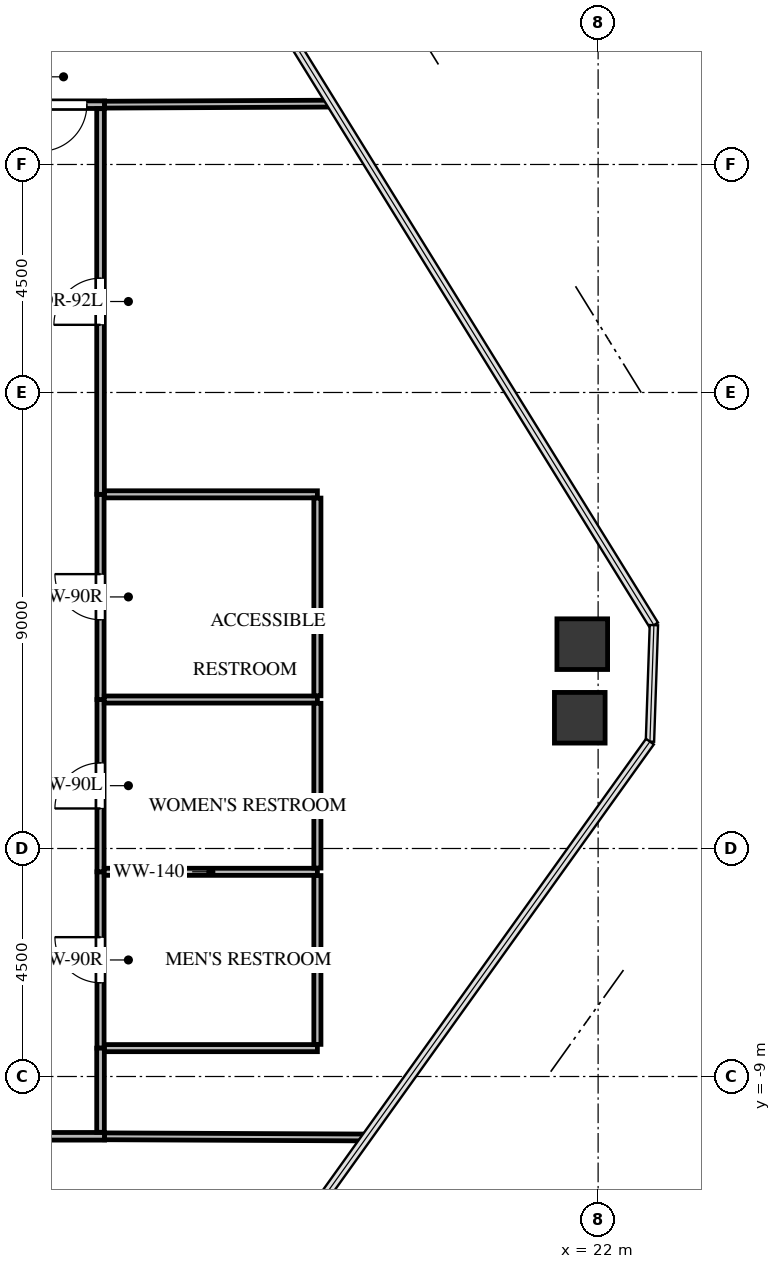
"""IFC4 building model, lengths in metres.
Left out: names, types, materials, properties, quantities, classifications, styles, units other than length and angle.
Written with IfcOpenShell. Run it as: python <this file> out.ifc"""

import sys

from ifc_helpers import new_model, si_unit, direction, frame, frame_2d, origin, origin_2d, place, context, subcontext, project, spatial, rectangle, extrude, source, transform, mapped, element, fill, save


model = new_model("IFC4")
c1 = context("Model", 3, precision=1e-05, world=origin(), true_north=direction((0.0, 1.0)))
c2 = subcontext(c1, "Body", "Model", "MODEL_VIEW")
j1 = project(units=[si_unit("LENGTHUNIT", "METRE"), si_unit("PLANEANGLEUNIT", "RADIAN")], contexts=[c1])
p1 = place(None, origin())
s1 = spatial("IfcSite", under=j1, at=p1, CompositionType="ELEMENT")
p2 = place(p1, origin())
s2 = spatial("IfcBuilding", under=s1, at=p2, CompositionType="ELEMENT")
p3 = place(p2, frame((0.0, 0.0, 187.0)))
s3 = spatial("IfcBuildingStorey", under=s2, at=p3, CompositionType="ELEMENT", Elevation=187.0)
m1 = source(origin(), c2, "Body", "SweptSolid", [
    extrude(rectangle(XDim=1.0, YDim=1.0, at=origin_2d()), origin(), (0.0, 0.0, 1.0), 3.3),
])
for number, where, z_axis, x_axis in (
    (1, (21.687, -0.467, -0.24), (0.0, 0.0, 1.0), (1.0, 0.0, 0.0)),
    (2, (21.638, -1.92, -0.24), (0.0, 0.0, 1.0), (1.0, 0.0, 0.0)),
):
    element("IfcColumn", number, at=place(p3, frame(where, z_axis=z_axis, x_axis=x_axis)), inside=s3, PredefinedType="COLUMN", context=c2, shape_type="MappedRepresentation", body=[
        mapped(m1, transform((0.0, 0.0, 0.0), x_axis=(1.0, 0.0, 0.0), y_axis=(0.0, 1.0, 0.0), z_axis=(0.0, 0.0, 1.0), scale=1.0)),
    ])
p4 = place(p3, frame((12.18, -8.44, 0.0), z_axis=(0.0, 0.0, 1.0), x_axis=(0.0, 1.0, 0.0)))
e3 = element("IfcWall", 3, at=p4, inside=s3, PredefinedType="PARTITIONING", context=c2, shape_type="SweptSolid", body=[
    extrude(rectangle(XDim=3.48, YDim=0.14, at=frame_2d((1.74, 0.0))), origin(), (0.0, 0.0, 1.0), 3.045),
])
p5 = place(p4, frame((1.29, 0.0, 0.0)))
e4 = element("IfcOpeningElement", 4, at=p5, cuts=e3, PredefinedType="OPENING", context=c2, shape_type="SweptSolid", body=[
    extrude(rectangle(XDim=0.9, YDim=2.05, at=frame_2d((0.45, 1.025))), frame((0.0, 0.08, 0.0), z_axis=(0.0, -1.0, 0.0), x_axis=(1.0, 0.0, 0.0)), (0.0, 0.0, 1.0), 0.16),
])
p6 = place(p3, frame((12.18, -4.96, 0.0), z_axis=(0.0, 0.0, 1.0), x_axis=(0.0, 1.0, 0.0)))
e5 = element("IfcWall", 5, at=p6, inside=s3, PredefinedType="PARTITIONING", context=c2, shape_type="SweptSolid", body=[
    extrude(rectangle(XDim=3.4, YDim=0.14, at=frame_2d((1.7, 0.0))), origin(), (0.0, 0.0, 1.0), 3.045),
])
p7 = place(p6, frame((1.25, 0.0, 0.0)))
e6 = element("IfcOpeningElement", 6, at=p7, cuts=e5, PredefinedType="OPENING", context=c2, shape_type="SweptSolid", body=[
    extrude(rectangle(XDim=0.9, YDim=2.05, at=frame_2d((0.45, 1.025))), frame((0.0, 0.08, 0.0), z_axis=(0.0, -1.0, 0.0), x_axis=(1.0, 0.0, 0.0)), (0.0, 0.0, 1.0), 0.16),
])
p8 = place(p3, frame((12.18, -1.56, 0.0), z_axis=(0.0, 0.0, 1.0), x_axis=(0.0, 1.0, 0.0)))
e7 = element("IfcWall", 7, at=p8, inside=s3, PredefinedType="PARTITIONING", context=c2, shape_type="SweptSolid", body=[
    extrude(rectangle(XDim=4.05, YDim=0.14, at=frame_2d((2.025, 0.0))), origin(), (0.0, 0.0, 1.0), 2.242),
])
p9 = place(p8, frame((1.575, 0.0, 0.0)))
e8 = element("IfcOpeningElement", 8, at=p9, cuts=e7, PredefinedType="OPENING", context=c2, shape_type="SweptSolid", body=[
    extrude(rectangle(XDim=0.9, YDim=2.05, at=frame_2d((0.45, 1.025))), frame((0.0, 0.08, 0.0), z_axis=(0.0, -1.0, 0.0), x_axis=(1.0, 0.0, 0.0)), (0.0, 0.0, 1.0), 0.16),
])
p10 = place(p3, frame((12.26, 10.18, 0.0), z_axis=(0.0, 0.0, 1.0), x_axis=(-1.0, 0.0, 0.0)))
e9 = element("IfcWall", 9, at=p10, inside=s3, PredefinedType="PARTITIONING", context=c2, shape_type="SweptSolid", body=[
    extrude(rectangle(XDim=6.72, YDim=0.15, at=frame_2d((3.36, 0.0))), origin(), (0.0, 0.0, 1.0), 2.242),
])
p11 = place(p10, frame((0.35, 0.0, 0.0)))
e10 = element("IfcOpeningElement", 10, at=p11, cuts=e9, PredefinedType="OPENING", context=c2, shape_type="SweptSolid", body=[
    extrude(rectangle(XDim=0.92, YDim=2.1, at=frame_2d((0.46, 1.05))), frame((0.0, 0.085, 0.0), z_axis=(0.0, -1.0, 0.0), x_axis=(1.0, 0.0, 0.0)), (0.0, 0.0, 1.0), 0.17),
])
p12 = place(p3, frame((4.04, -10.18, 0.0), z_axis=(0.0, 0.0, 1.0), x_axis=(1.0, 0.0, 0.0)))
e11 = element("IfcWall", 11, at=p12, inside=s3, PredefinedType="PARTITIONING", context=c2, shape_type="SweptSolid", body=[
    extrude(rectangle(XDim=8.22, YDim=0.15, at=frame_2d((4.11, 0.0))), origin(), (0.0, 0.0, 1.0), 2.242),
])
p13 = place(p12, frame((3.635, 0.0, 0.0)))
e12 = element("IfcOpeningElement", 12, at=p13, cuts=e11, PredefinedType="OPENING", context=c2, shape_type="SweptSolid", body=[
    extrude(rectangle(XDim=0.95, YDim=2.1, at=frame_2d((0.475, 1.05))), frame((0.0, 0.085, 0.0), z_axis=(0.0, -1.0, 0.0), x_axis=(1.0, 0.0, 0.0)), (0.0, 0.0, 1.0), 0.17),
])
p14 = place(p3, frame((12.18, 2.49, 0.0), z_axis=(0.0, 0.0, 1.0), x_axis=(0.0, 1.0, 0.0)))
e13 = element("IfcWall", 13, at=p14, inside=s3, PredefinedType="PARTITIONING", context=c2, shape_type="SweptSolid", body=[
    extrude(rectangle(XDim=7.611, YDim=0.15, at=frame_2d((3.806, 0.0))), origin(), (0.0, 0.0, 1.0), 3.045),
])
p15 = place(p14, frame((3.345, 0.0, 0.0)))
e14 = element("IfcOpeningElement", 14, at=p15, cuts=e13, PredefinedType="OPENING", context=c2, shape_type="SweptSolid", body=[
    extrude(rectangle(XDim=0.92, YDim=2.1, at=frame_2d((0.46, 1.05))), frame((0.0, 0.085, 0.0), z_axis=(0.0, -1.0, 0.0), x_axis=(1.0, 0.0, 0.0)), (0.0, 0.0, 1.0), 0.17),
])
p16 = place(p3, frame((12.18, -10.101, 0.0), z_axis=(0.0, 0.0, 1.0), x_axis=(0.0, 1.0, 0.0)))
e15 = element("IfcWall", 15, at=p16, inside=s3, PredefinedType="PARTITIONING", context=c2, shape_type="SweptSolid", body=[
    extrude(rectangle(XDim=1.661, YDim=0.15, at=frame_2d((0.831, 0.0))), origin(), (0.0, 0.0, 1.0), 3.045),
])
p17 = place(p3, frame((12.254, -4.96, 0.0), z_axis=(0.0, 0.0, 1.0), x_axis=(1.0, 0.0, 0.0)))
e16 = element("IfcWall", 16, at=p17, inside=s3, PredefinedType="PARTITIONING", context=c2, shape_type="SweptSolid", body=[
    extrude(rectangle(XDim=4.206, YDim=0.14, at=frame_2d((2.103, 0.0))), origin(), (0.0, 0.0, 1.0), 3.045),
])
p18 = place(p3, frame((16.46, -8.44, 0.0), z_axis=(0.0, 0.0, 1.0), x_axis=(-1.0, 0.0, 0.0)))
e17 = element("IfcWall", 17, at=p18, inside=s3, PredefinedType="PARTITIONING", context=c2, shape_type="SweptSolid", body=[
    extrude(rectangle(XDim=4.201, YDim=0.14, at=frame_2d((2.101, 0.0))), origin(), (0.0, 0.0, 1.0), 3.045),
])
p19 = place(p3, frame((16.46, -5.034, 0.0), z_axis=(0.0, 0.0, 1.0), x_axis=(0.0, -1.0, 0.0)))
e18 = element("IfcWall", 18, at=p19, inside=s3, PredefinedType="PARTITIONING", context=c2, shape_type="SweptSolid", body=[
    extrude(rectangle(XDim=3.332, YDim=0.14, at=frame_2d((1.666, 0.0))), origin(), (0.0, 0.0, 1.0), 3.045),
])
p20 = place(p3, frame((12.254, -1.56, 0.0), z_axis=(0.0, 0.0, 1.0), x_axis=(1.0, 0.0, 0.0)))
e19 = element("IfcWall", 19, at=p20, inside=s3, PredefinedType="PARTITIONING", context=c2, shape_type="SweptSolid", body=[
    extrude(rectangle(XDim=4.206, YDim=0.14, at=frame_2d((2.103, 0.0))), origin(), (0.0, 0.0, 1.0), 3.045),
])
p21 = place(p3, frame((16.46, -1.634, 0.0), z_axis=(0.0, 0.0, 1.0), x_axis=(0.0, -1.0, 0.0)))
e20 = element("IfcWall", 20, at=p21, inside=s3, PredefinedType="PARTITIONING", context=c2, shape_type="SweptSolid", body=[
    extrude(rectangle(XDim=3.252, YDim=0.14, at=frame_2d((1.626, 0.0))), origin(), (0.0, 0.0, 1.0), 3.045),
])
p22 = place(p3, frame((12.259, 2.49, 0.0), z_axis=(0.0, 0.0, 1.0), x_axis=(1.0, 0.0, 0.0)))
e21 = element("IfcWall", 21, at=p22, inside=s3, PredefinedType="PARTITIONING", context=c2, shape_type="SweptSolid", body=[
    extrude(rectangle(XDim=4.201, YDim=0.14, at=frame_2d((2.101, 0.0))), origin(), (0.0, 0.0, 1.0), 3.045),
])
p23 = place(p3, frame((16.46, 2.416, 0.0), z_axis=(0.0, 0.0, 1.0), x_axis=(0.0, -1.0, 0.0)))
e22 = element("IfcWall", 22, at=p23, inside=s3, PredefinedType="PARTITIONING", context=c2, shape_type="SweptSolid", body=[
    extrude(rectangle(XDim=3.902, YDim=0.14, at=frame_2d((1.951, 0.0))), origin(), (0.0, 0.0, 1.0), 2.242),
])
p24 = place(p3, frame((16.74, 10.201, 0.0), z_axis=(0.0, 0.0, 1.0), x_axis=(-0.999989522694, -0.004577608714, 0.0)))
e23 = element("IfcWall", 23, at=p24, inside=s3, PredefinedType="PARTITIONING", context=c2, shape_type="SweptSolid", body=[
    extrude(rectangle(XDim=4.48, YDim=0.135, at=frame_2d((2.24, 0.0))), origin(), (0.0, 0.0, 1.0), 2.399),
])
p25 = place(p3, frame((12.26, -10.18, 0.0), z_axis=(0.0, 0.0, 1.0), x_axis=(0.999990144117, -0.004439782427, 0.0)))
e24 = element("IfcWall", 24, at=p25, inside=s3, PredefinedType="PARTITIONING", context=c2, shape_type="SweptSolid", body=[
    extrude(rectangle(XDim=5.169, YDim=0.135, at=frame_2d((2.584, 0.0))), origin(), (0.0, 0.0, 1.0), 2.399),
])
m2 = source(origin(), c2, "Body", "SweptSolid", [
    extrude(rectangle(XDim=0.9, YDim=2.05, at=frame_2d((0.45, 1.025))), frame((0.0, 0.025, 0.0), z_axis=(0.0, -1.0, 0.0), x_axis=(1.0, 0.0, 0.0)), (0.0, 0.0, 1.0), 0.05),
])
p26 = place(p5, origin())
e25 = element("IfcDoor", 25, at=p26, inside=s3, OperationType="SINGLE_SWING_RIGHT", PredefinedType="DOOR", context=c2, shape_type="MappedRepresentation", body=[
    mapped(m2, transform((0.0, 0.0, 0.0), x_axis=(1.0, 0.0, 0.0), y_axis=(0.0, 1.0, 0.0), z_axis=(0.0, 0.0, 1.0), scale=1.0)),
])
fill(e4, e25)
m3 = source(origin(), c2, "Body", "SweptSolid", [
    extrude(rectangle(XDim=0.9, YDim=2.05, at=frame_2d((0.45, 1.025))), frame((0.0, 0.025, 0.0), z_axis=(0.0, -1.0, 0.0), x_axis=(1.0, 0.0, 0.0)), (0.0, 0.0, 1.0), 0.05),
])
p27 = place(p7, origin())
e26 = element("IfcDoor", 26, at=p27, inside=s3, OperationType="SINGLE_SWING_LEFT", PredefinedType="DOOR", context=c2, shape_type="MappedRepresentation", body=[
    mapped(m3, transform((0.0, 0.0, 0.0), x_axis=(1.0, 0.0, 0.0), y_axis=(0.0, 1.0, 0.0), z_axis=(0.0, 0.0, 1.0), scale=1.0)),
])
fill(e6, e26)
p28 = place(p9, origin())
e27 = element("IfcDoor", 27, at=p28, inside=s3, OperationType="SINGLE_SWING_RIGHT", PredefinedType="DOOR", context=c2, shape_type="MappedRepresentation", body=[
    mapped(m2, transform((0.0, 0.0, 0.0), x_axis=(1.0, 0.0, 0.0), y_axis=(0.0, 1.0, 0.0), z_axis=(0.0, 0.0, 1.0), scale=1.0)),
])
fill(e8, e27)
m4 = source(origin(), c2, "Body", "SweptSolid", [
    extrude(rectangle(XDim=0.92, YDim=2.1, at=frame_2d((0.46, 1.05))), frame((0.0, 0.025, 0.0), z_axis=(0.0, -1.0, 0.0), x_axis=(1.0, 0.0, 0.0)), (0.0, 0.0, 1.0), 0.05),
])
p29 = place(p11, origin())
e28 = element("IfcDoor", 28, at=p29, inside=s3, OperationType="SINGLE_SWING_RIGHT", PredefinedType="DOOR", context=c2, shape_type="MappedRepresentation", body=[
    mapped(m4, transform((0.0, 0.0, 0.0), x_axis=(1.0, 0.0, 0.0), y_axis=(0.0, 1.0, 0.0), z_axis=(0.0, 0.0, 1.0), scale=1.0)),
])
fill(e10, e28)
m5 = source(origin(), c2, "Body", "SweptSolid", [
    extrude(rectangle(XDim=0.92, YDim=2.1, at=frame_2d((0.46, 1.05))), frame((0.0, 0.025, 0.0), z_axis=(0.0, -1.0, 0.0), x_axis=(1.0, 0.0, 0.0)), (0.0, 0.0, 1.0), 0.05),
])
p30 = place(p15, origin())
e29 = element("IfcDoor", 29, at=p30, inside=s3, OperationType="SINGLE_SWING_LEFT", PredefinedType="DOOR", context=c2, shape_type="MappedRepresentation", body=[
    mapped(m5, transform((0.0, 0.0, 0.0), x_axis=(1.0, 0.0, 0.0), y_axis=(0.0, 1.0, 0.0), z_axis=(0.0, 0.0, 1.0), scale=1.0)),
])
fill(e14, e29)
save(model, sys.argv[1])
